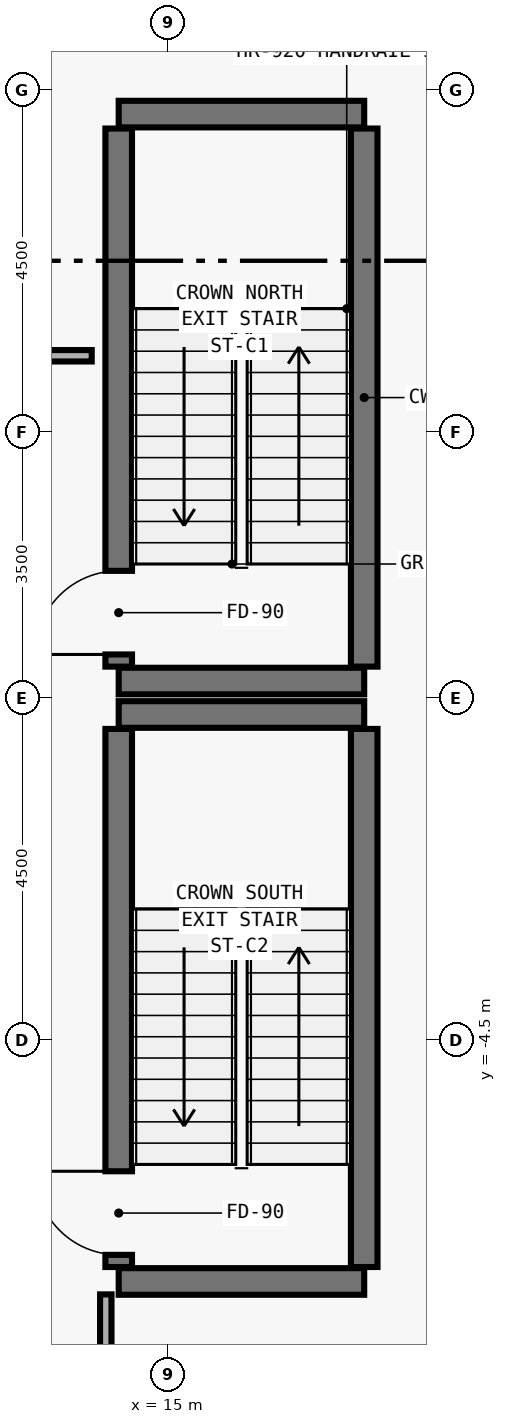
"""IFC4 building model, lengths in metres.
Left out: names, types, materials, properties, quantities, classifications, styles, units other than length and angle.
Written with IfcOpenShell. Run it as: python <this file> out.ifc"""

import sys

from ifc_helpers import new_model, si_unit, direction, frame, frame_2d, origin, place, context, subcontext, project, spatial, rectangle, extrude, element, fill, save


model = new_model("IFC4")
c1 = context("Model", 3, precision=1e-05, world=origin(), true_north=direction((0.0, 1.0)))
c2 = subcontext(c1, "Body", "Model", "MODEL_VIEW")
j1 = project(units=[si_unit("LENGTHUNIT", "METRE"), si_unit("PLANEANGLEUNIT", "RADIAN")], contexts=[c1])
p1 = place(None, origin())
s1 = spatial("IfcSite", under=j1, at=p1, CompositionType="ELEMENT")
p2 = place(p1, origin())
s2 = spatial("IfcBuilding", under=s1, at=p2, CompositionType="ELEMENT")
p3 = place(p2, frame((0.0, 0.0, 289.5)))
s3 = spatial("IfcBuildingStorey", under=s2, at=p3, CompositionType="ELEMENT", Elevation=289.5)
for number, where, z_axis, x_axis in (
    (1, (14.35, 0.22, 0.0), (0.0, 0.0, 1.0), (1.0, 0.0, 0.0)),
    (2, (14.35, 7.68, 0.0), (0.0, 0.0, 1.0), (1.0, 0.0, 0.0)),
):
    element("IfcWall", number, at=place(p3, frame(where, z_axis=z_axis, x_axis=x_axis)), inside=s3, PredefinedType="SHEAR", context=c2, shape_type="SweptSolid", body=[
        extrude(rectangle(XDim=3.23, YDim=0.35, at=frame_2d((1.615, 0.0))), origin(), (0.0, 0.0, 1.0), 4.492),
    ])
p4 = place(p3, frame((14.35, 0.41, 0.0), z_axis=(0.0, 0.0, 1.0), x_axis=(0.0, 1.0, 0.0)))
e3 = element("IfcWall", 3, at=p4, inside=s3, PredefinedType="SHEAR", context=c2, shape_type="SweptSolid", body=[
    extrude(rectangle(XDim=7.08, YDim=0.35, at=frame_2d((3.54, 0.0))), origin(), (0.0, 0.0, 1.0), 4.492),
])
p5 = place(p4, frame((0.16, 0.0, 0.0)))
e4 = element("IfcOpeningElement", 4, at=p5, cuts=e3, PredefinedType="OPENING", context=c2, shape_type="SweptSolid", body=[
    extrude(rectangle(XDim=1.1, YDim=2.15, at=frame_2d((0.55, 1.075))), frame((0.0, 0.185, 0.0), z_axis=(0.0, -1.0, 0.0), x_axis=(1.0, 0.0, 0.0)), (0.0, 0.0, 1.0), 0.37),
])
p6 = place(p3, frame((17.58, 0.41, 0.0), z_axis=(0.0, 0.0, 1.0), x_axis=(0.0, 1.0, 0.0)))
e5 = element("IfcWall", 5, at=p6, inside=s3, PredefinedType="SHEAR", context=c2, shape_type="SweptSolid", body=[
    extrude(rectangle(XDim=7.08, YDim=0.35, at=frame_2d((3.54, 0.0))), origin(), (0.0, 0.0, 1.0), 4.492),
])
for number, where, z_axis, x_axis in (
    (6, (14.35, -7.68, 0.0), (0.0, 0.0, 1.0), (1.0, 0.0, 0.0)),
    (7, (14.35, -0.22, 0.0), (0.0, 0.0, 1.0), (1.0, 0.0, 0.0)),
):
    element("IfcWall", number, at=place(p3, frame(where, z_axis=z_axis, x_axis=x_axis)), inside=s3, PredefinedType="SHEAR", context=c2, shape_type="SweptSolid", body=[
        extrude(rectangle(XDim=3.23, YDim=0.35, at=frame_2d((1.615, 0.0))), origin(), (0.0, 0.0, 1.0), 4.492),
    ])
p7 = place(p3, frame((14.35, -7.49, 0.0), z_axis=(0.0, 0.0, 1.0), x_axis=(0.0, 1.0, 0.0)))
e8 = element("IfcWall", 8, at=p7, inside=s3, PredefinedType="SHEAR", context=c2, shape_type="SweptSolid", body=[
    extrude(rectangle(XDim=7.08, YDim=0.35, at=frame_2d((3.54, 0.0))), origin(), (0.0, 0.0, 1.0), 4.492),
])
p8 = place(p7, frame((0.16, 0.0, 0.0)))
e9 = element("IfcOpeningElement", 9, at=p8, cuts=e8, PredefinedType="OPENING", context=c2, shape_type="SweptSolid", body=[
    extrude(rectangle(XDim=1.1, YDim=2.15, at=frame_2d((0.55, 1.075))), frame((0.0, 0.185, 0.0), z_axis=(0.0, -1.0, 0.0), x_axis=(1.0, 0.0, 0.0)), (0.0, 0.0, 1.0), 0.37),
])
p9 = place(p3, frame((17.58, -7.49, 0.0), z_axis=(0.0, 0.0, 1.0), x_axis=(0.0, 1.0, 0.0)))
e10 = element("IfcWall", 10, at=p9, inside=s3, PredefinedType="SHEAR", context=c2, shape_type="SweptSolid", body=[
    extrude(rectangle(XDim=7.08, YDim=0.35, at=frame_2d((3.54, 0.0))), origin(), (0.0, 0.0, 1.0), 4.492),
])
p10 = place(p3, frame((14.18, -8.815, 0.0), z_axis=(0.0, 0.0, 1.0), x_axis=(0.0, 1.0, 0.0)))
e11 = element("IfcWall", 11, at=p10, inside=s3, PredefinedType="PARTITIONING", context=c2, shape_type="SweptSolid", body=[
    extrude(rectangle(XDim=0.965, YDim=0.15, at=frame_2d((0.482, 0.0))), origin(), (0.0, 0.0, 1.0), 4.26),
])
p11 = place(p3, frame((13.995, 4.5, 0.0), z_axis=(0.0, 0.0, 1.0), x_axis=(-1.0, 0.0, 0.0)))
e12 = element("IfcWall", 12, at=p11, inside=s3, PredefinedType="PARTITIONING", context=c2, shape_type="SweptSolid", body=[
    extrude(rectangle(XDim=3.085, YDim=0.15, at=frame_2d((1.542, 0.0))), origin(), (0.0, 0.0, 1.0), 4.26),
])
p12 = place(p5, origin())
e13 = element("IfcDoor", 13, at=p12, inside=s3, OperationType="SINGLE_SWING_LEFT", PredefinedType="DOOR", context=c2, shape_type="SweptSolid", body=[
    extrude(rectangle(XDim=1.1, YDim=2.15, at=frame_2d((0.55, 1.075))), frame((0.0, 0.025, 0.0), z_axis=(0.0, -1.0, 0.0), x_axis=(1.0, 0.0, 0.0)), (0.0, 0.0, 1.0), 0.05),
])
fill(e4, e13)
p13 = place(p8, origin())
e14 = element("IfcDoor", 14, at=p13, inside=s3, OperationType="SINGLE_SWING_RIGHT", PredefinedType="DOOR", context=c2, shape_type="SweptSolid", body=[
    extrude(rectangle(XDim=1.1, YDim=2.15, at=frame_2d((0.55, 1.075))), frame((0.0, 0.025, 0.0), z_axis=(0.0, -1.0, 0.0), x_axis=(1.0, 0.0, 0.0)), (0.0, 0.0, 1.0), 0.05),
])
fill(e9, e14)
save(model, sys.argv[1])
